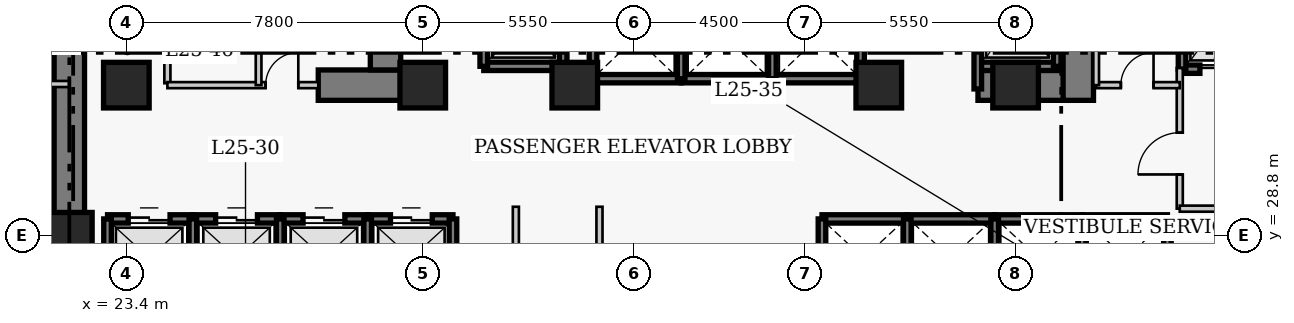
"""IFC4 building model, lengths in metres.
Left out: names, types, materials, properties, quantities, classifications, styles, units other than length and angle.
Written with IfcOpenShell. Run it as: python <this file> out.ifc"""

import sys

from ifc_helpers import new_model, si_unit, direction, frame, frame_2d, origin, origin_2d, place, context, subcontext, project, spatial, rectangle, extrude, element, fill, save


model = new_model("IFC4")
c1 = context("Model", 3, precision=1e-05, world=origin(), true_north=direction((0.0, 1.0)))
c2 = subcontext(c1, "Body", "Model", "MODEL_VIEW")
j1 = project(units=[si_unit("LENGTHUNIT", "METRE"), si_unit("PLANEANGLEUNIT", "RADIAN")], contexts=[c1])
p1 = place(None, origin())
s1 = spatial("IfcSite", under=j1, at=p1, CompositionType="ELEMENT")
p2 = place(p1, origin())
s2 = spatial("IfcBuilding", under=s1, at=p2, CompositionType="ELEMENT")
p3 = place(p2, frame((0.0, 0.0, 103.2)))
s3 = spatial("IfcBuildingStorey", under=s2, at=p3, CompositionType="ELEMENT", Elevation=103.2)
p4 = place(p3, frame((21.9, 27.05, 0.0), z_axis=(0.0, 0.0, 1.0), x_axis=(0.0, 1.0, 0.0)))
e1 = element("IfcWall", 1, at=p4, inside=s3, PredefinedType="SHEAR", context=c2, shape_type="SweptSolid", body=[
    extrude(rectangle(XDim=13.67, YDim=0.8, at=frame_2d((6.835, 0.0))), origin(), (0.0, 0.0, 1.0), 3.8),
])
p5 = place(p3, frame((28.45, 32.75, 0.0), z_axis=(0.0, 0.0, 1.0), x_axis=(1.0, 0.0, 0.0)))
e2 = element("IfcWall", 2, at=p5, inside=s3, PredefinedType="SHEAR", context=c2, shape_type="SweptSolid", body=[
    extrude(rectangle(XDim=2.4, YDim=0.8, at=frame_2d((1.2, 0.0))), origin(), (0.0, 0.0, 1.0), 3.8),
])
p6 = place(p3, frame((45.81, 32.75, 0.0), z_axis=(0.0, 0.0, 1.0), x_axis=(1.0, 0.0, 0.0)))
e3 = element("IfcWall", 3, at=p6, inside=s3, PredefinedType="SHEAR", context=c2, shape_type="SweptSolid", body=[
    extrude(rectangle(XDim=2.64, YDim=0.8, at=frame_2d((1.32, 0.0))), origin(), (0.0, 0.0, 1.0), 3.8),
])
p7 = place(p3, frame((30.22, 33.15, 0.0), z_axis=(0.0, 0.0, 1.0), x_axis=(0.0, 1.0, 0.0)))
e4 = element("IfcWall", 4, at=p7, inside=s3, PredefinedType="SHEAR", context=c2, shape_type="SweptSolid", body=[
    extrude(rectangle(XDim=7.17, YDim=0.8, at=frame_2d((3.585, 0.0))), origin(), (0.0, 0.0, 1.0), 3.8),
])
p8 = place(p3, frame((48.45, 32.35, 0.0), z_axis=(0.0, 0.0, 1.0), x_axis=(0.0, 1.0, 0.0)))
e5 = element("IfcWall", 5, at=p8, inside=s3, PredefinedType="SHEAR", context=c2, shape_type="SweptSolid", body=[
    extrude(rectangle(XDim=7.97, YDim=0.8, at=frame_2d((3.985, 0.0))), origin(), (0.0, 0.0, 1.0), 3.8),
])
p9 = place(p8, frame((5.85, 0.0, 0.0)))
e6 = element("IfcOpeningElement", 6, at=p9, cuts=e5, PredefinedType="OPENING", context=c2, shape_type="SweptSolid", body=[
    extrude(rectangle(XDim=1.1, YDim=2.15, at=frame_2d((0.55, 1.075))), frame((0.0, 0.41, 0.0), z_axis=(0.0, -1.0, 0.0), x_axis=(1.0, 0.0, 0.0)), (0.0, 0.0, 1.0), 0.82),
])
for number, where, z_axis, x_axis in (
    (7, (21.9, 28.8, 0.0), (0.0, 0.0, 1.0), (1.0, 0.0, 0.0)),
    (8, (23.4, 32.75, 0.0), (0.0, 0.0, 1.0), (1.0, 0.0, 0.0)),
    (9, (31.2, 32.75, 0.0), (0.0, 0.0, 1.0), (1.0, 0.0, 0.0)),
    (10, (35.2, 32.75, 0.0), (0.0, 0.0, 1.0), (1.0, 0.0, 0.0)),
    (11, (43.2, 32.75, 0.0), (0.0, 0.0, 1.0), (1.0, 0.0, 0.0)),
    (12, (46.8, 32.75, 0.0), (0.0, 0.0, 1.0), (1.0, 0.0, 0.0)),
):
    element("IfcColumn", number, at=place(p3, frame(where, z_axis=z_axis, x_axis=x_axis)), inside=s3, PredefinedType="COLUMN", context=c2, shape_type="SweptSolid", body=[
        extrude(rectangle(XDim=1.2, YDim=1.2, at=origin_2d()), origin(), (0.0, 0.0, 1.0), 3.8),
    ])
p10 = place(p3, frame((22.905, 29.23, 0.0), z_axis=(0.0, 0.0, 1.0), x_axis=(1.0, 0.0, 0.0)))
e13 = element("IfcWall", 13, at=p10, inside=s3, PredefinedType="SHEAR", context=c2, shape_type="SweptSolid", body=[
    extrude(rectangle(XDim=2.245, YDim=0.22, at=frame_2d((1.123, 0.0))), origin(), (0.0, 0.0, 1.0), 3.8),
])
p11 = place(p10, frame((0.545, 0.0, 0.0)))
e14 = element("IfcOpeningElement", 14, at=p11, cuts=e13, PredefinedType="OPENING", context=c2, shape_type="SweptSolid", body=[
    extrude(rectangle(XDim=1.1, YDim=2.15, at=frame_2d((0.55, 1.075))), frame((0.0, 0.12, 0.0), z_axis=(0.0, -1.0, 0.0), x_axis=(1.0, 0.0, 0.0)), (0.0, 0.0, 1.0), 0.24),
])
p12 = place(p3, frame((22.905, 27.17, 0.0), z_axis=(0.0, 0.0, 1.0), x_axis=(0.0, 1.0, 0.0)))
e15 = element("IfcWall", 15, at=p12, inside=s3, PredefinedType="SHEAR", context=c2, shape_type="SweptSolid", body=[
    extrude(rectangle(XDim=2.06, YDim=0.2, at=frame_2d((1.03, 0.0))), origin(), (0.0, 0.0, 1.0), 3.8),
])
p13 = place(p3, frame((25.15, 29.23, 0.0), z_axis=(0.0, 0.0, 1.0), x_axis=(1.0, 0.0, 0.0)))
e16 = element("IfcWall", 16, at=p13, inside=s3, PredefinedType="SHEAR", context=c2, shape_type="SweptSolid", body=[
    extrude(rectangle(XDim=2.3, YDim=0.22, at=frame_2d((1.15, 0.0))), origin(), (0.0, 0.0, 1.0), 3.8),
])
p14 = place(p13, frame((0.6, 0.0, 0.0)))
e17 = element("IfcOpeningElement", 17, at=p14, cuts=e16, PredefinedType="OPENING", context=c2, shape_type="SweptSolid", body=[
    extrude(rectangle(XDim=1.1, YDim=2.15, at=frame_2d((0.55, 1.075))), frame((0.0, 0.12, 0.0), z_axis=(0.0, -1.0, 0.0), x_axis=(1.0, 0.0, 0.0)), (0.0, 0.0, 1.0), 0.24),
])
p15 = place(p3, frame((25.15, 27.17, 0.0), z_axis=(0.0, 0.0, 1.0), x_axis=(0.0, 1.0, 0.0)))
e18 = element("IfcWall", 18, at=p15, inside=s3, PredefinedType="SHEAR", context=c2, shape_type="SweptSolid", body=[
    extrude(rectangle(XDim=2.06, YDim=0.2, at=frame_2d((1.03, 0.0))), origin(), (0.0, 0.0, 1.0), 3.8),
])
p16 = place(p3, frame((27.45, 29.23, 0.0), z_axis=(0.0, 0.0, 1.0), x_axis=(1.0, 0.0, 0.0)))
e19 = element("IfcWall", 19, at=p16, inside=s3, PredefinedType="SHEAR", context=c2, shape_type="SweptSolid", body=[
    extrude(rectangle(XDim=2.3, YDim=0.22, at=frame_2d((1.15, 0.0))), origin(), (0.0, 0.0, 1.0), 3.8),
])
p17 = place(p16, frame((0.6, 0.0, 0.0)))
e20 = element("IfcOpeningElement", 20, at=p17, cuts=e19, PredefinedType="OPENING", context=c2, shape_type="SweptSolid", body=[
    extrude(rectangle(XDim=1.1, YDim=2.15, at=frame_2d((0.55, 1.075))), frame((0.0, 0.12, 0.0), z_axis=(0.0, -1.0, 0.0), x_axis=(1.0, 0.0, 0.0)), (0.0, 0.0, 1.0), 0.24),
])
p18 = place(p3, frame((27.45, 27.17, 0.0), z_axis=(0.0, 0.0, 1.0), x_axis=(0.0, 1.0, 0.0)))
e21 = element("IfcWall", 21, at=p18, inside=s3, PredefinedType="SHEAR", context=c2, shape_type="SweptSolid", body=[
    extrude(rectangle(XDim=2.06, YDim=0.2, at=frame_2d((1.03, 0.0))), origin(), (0.0, 0.0, 1.0), 3.8),
])
p19 = place(p3, frame((29.75, 29.23, 0.0), z_axis=(0.0, 0.0, 1.0), x_axis=(1.0, 0.0, 0.0)))
e22 = element("IfcWall", 22, at=p19, inside=s3, PredefinedType="SHEAR", context=c2, shape_type="SweptSolid", body=[
    extrude(rectangle(XDim=2.245, YDim=0.22, at=frame_2d((1.123, 0.0))), origin(), (0.0, 0.0, 1.0), 3.8),
])
p20 = place(p19, frame((0.6, 0.0, 0.0)))
e23 = element("IfcOpeningElement", 23, at=p20, cuts=e22, PredefinedType="OPENING", context=c2, shape_type="SweptSolid", body=[
    extrude(rectangle(XDim=1.1, YDim=2.15, at=frame_2d((0.55, 1.075))), frame((0.0, 0.12, 0.0), z_axis=(0.0, -1.0, 0.0), x_axis=(1.0, 0.0, 0.0)), (0.0, 0.0, 1.0), 0.24),
])
for number, where, z_axis, x_axis in (
    (24, (29.75, 27.17, 0.0), (0.0, 0.0, 1.0), (0.0, 1.0, 0.0)),
    (25, (31.995, 27.17, 0.0), (0.0, 0.0, 1.0), (0.0, 1.0, 0.0)),
):
    element("IfcWall", number, at=place(p3, frame(where, z_axis=z_axis, x_axis=x_axis)), inside=s3, PredefinedType="SHEAR", context=c2, shape_type="SweptSolid", body=[
        extrude(rectangle(XDim=2.06, YDim=0.2, at=frame_2d((1.03, 0.0))), origin(), (0.0, 0.0, 1.0), 3.8),
    ])
p21 = place(p3, frame((41.705, 29.23, 0.0), z_axis=(0.0, 0.0, 1.0), x_axis=(1.0, 0.0, 0.0)))
e26 = element("IfcWall", 26, at=p21, inside=s3, PredefinedType="SHEAR", context=c2, shape_type="SweptSolid", body=[
    extrude(rectangle(XDim=2.245, YDim=0.22, at=frame_2d((1.123, 0.0))), origin(), (0.0, 0.0, 1.0), 3.8),
])
p22 = place(p3, frame((41.705, 27.17, 0.0), z_axis=(0.0, 0.0, 1.0), x_axis=(0.0, 1.0, 0.0)))
e27 = element("IfcWall", 27, at=p22, inside=s3, PredefinedType="SHEAR", context=c2, shape_type="SweptSolid", body=[
    extrude(rectangle(XDim=2.06, YDim=0.2, at=frame_2d((1.03, 0.0))), origin(), (0.0, 0.0, 1.0), 3.8),
])
p23 = place(p3, frame((43.95, 29.23, 0.0), z_axis=(0.0, 0.0, 1.0), x_axis=(1.0, 0.0, 0.0)))
e28 = element("IfcWall", 28, at=p23, inside=s3, PredefinedType="SHEAR", context=c2, shape_type="SweptSolid", body=[
    extrude(rectangle(XDim=2.3, YDim=0.22, at=frame_2d((1.15, 0.0))), origin(), (0.0, 0.0, 1.0), 3.8),
])
p24 = place(p3, frame((43.95, 27.17, 0.0), z_axis=(0.0, 0.0, 1.0), x_axis=(0.0, 1.0, 0.0)))
e29 = element("IfcWall", 29, at=p24, inside=s3, PredefinedType="SHEAR", context=c2, shape_type="SweptSolid", body=[
    extrude(rectangle(XDim=2.06, YDim=0.2, at=frame_2d((1.03, 0.0))), origin(), (0.0, 0.0, 1.0), 3.8),
])
p25 = place(p3, frame((46.25, 29.23, 0.0), z_axis=(0.0, 0.0, 1.0), x_axis=(1.0, 0.0, 0.0)))
e30 = element("IfcWall", 30, at=p25, inside=s3, PredefinedType="SHEAR", context=c2, shape_type="SweptSolid", body=[
    extrude(rectangle(XDim=2.3, YDim=0.22, at=frame_2d((1.15, 0.0))), origin(), (0.0, 0.0, 1.0), 3.8),
])
p26 = place(p3, frame((46.25, 27.17, 0.0), z_axis=(0.0, 0.0, 1.0), x_axis=(0.0, 1.0, 0.0)))
e31 = element("IfcWall", 31, at=p26, inside=s3, PredefinedType="SHEAR", context=c2, shape_type="SweptSolid", body=[
    extrude(rectangle(XDim=2.06, YDim=0.2, at=frame_2d((1.03, 0.0))), origin(), (0.0, 0.0, 1.0), 3.8),
])
p27 = place(p3, frame((48.55, 29.23, 0.0), z_axis=(0.0, 0.0, 1.0), x_axis=(1.0, 0.0, 0.0)))
e32 = element("IfcWall", 32, at=p27, inside=s3, PredefinedType="SHEAR", context=c2, shape_type="SweptSolid", body=[
    extrude(rectangle(XDim=2.245, YDim=0.22, at=frame_2d((1.123, 0.0))), origin(), (0.0, 0.0, 1.0), 3.8),
])
for number, where, z_axis, x_axis in (
    (33, (48.55, 27.17, 0.0), (0.0, 0.0, 1.0), (0.0, 1.0, 0.0)),
    (34, (50.795, 27.17, 0.0), (0.0, 0.0, 1.0), (0.0, 1.0, 0.0)),
):
    element("IfcWall", number, at=place(p3, frame(where, z_axis=z_axis, x_axis=x_axis)), inside=s3, PredefinedType="SHEAR", context=c2, shape_type="SweptSolid", body=[
        extrude(rectangle(XDim=2.06, YDim=0.2, at=frame_2d((1.03, 0.0))), origin(), (0.0, 0.0, 1.0), 3.8),
    ])
p28 = place(p3, frame((35.68, 32.92, 0.0), z_axis=(0.0, 0.0, 1.0), x_axis=(1.0, 0.0, 0.0)))
e35 = element("IfcWall", 35, at=p28, inside=s3, PredefinedType="SHEAR", context=c2, shape_type="SweptSolid", body=[
    extrude(rectangle(XDim=2.32, YDim=0.22, at=frame_2d((1.16, 0.0))), origin(), (0.0, 0.0, 1.0), 3.8),
])
p29 = place(p3, frame((35.68, 32.92, 0.0), z_axis=(0.0, 0.0, 1.0), x_axis=(0.0, 1.0, 0.0)))
e36 = element("IfcWall", 36, at=p29, inside=s3, PredefinedType="SHEAR", context=c2, shape_type="SweptSolid", body=[
    extrude(rectangle(XDim=2.16, YDim=0.2, at=frame_2d((1.08, 0.0))), origin(), (0.0, 0.0, 1.0), 3.8),
])
p30 = place(p3, frame((38.0, 32.92, 0.0), z_axis=(0.0, 0.0, 1.0), x_axis=(1.0, 0.0, 0.0)))
e37 = element("IfcWall", 37, at=p30, inside=s3, PredefinedType="SHEAR", context=c2, shape_type="SweptSolid", body=[
    extrude(rectangle(XDim=2.4, YDim=0.22, at=frame_2d((1.2, 0.0))), origin(), (0.0, 0.0, 1.0), 3.8),
])
p31 = place(p3, frame((38.0, 32.92, 0.0), z_axis=(0.0, 0.0, 1.0), x_axis=(0.0, 1.0, 0.0)))
e38 = element("IfcWall", 38, at=p31, inside=s3, PredefinedType="SHEAR", context=c2, shape_type="SweptSolid", body=[
    extrude(rectangle(XDim=2.16, YDim=0.2, at=frame_2d((1.08, 0.0))), origin(), (0.0, 0.0, 1.0), 3.8),
])
p32 = place(p3, frame((40.4, 32.92, 0.0), z_axis=(0.0, 0.0, 1.0), x_axis=(1.0, 0.0, 0.0)))
e39 = element("IfcWall", 39, at=p32, inside=s3, PredefinedType="SHEAR", context=c2, shape_type="SweptSolid", body=[
    extrude(rectangle(XDim=2.32, YDim=0.22, at=frame_2d((1.16, 0.0))), origin(), (0.0, 0.0, 1.0), 3.8),
])
for number, where, z_axis, x_axis in (
    (40, (40.4, 32.92, 0.0), (0.0, 0.0, 1.0), (0.0, 1.0, 0.0)),
    (41, (42.72, 32.92, 0.0), (0.0, 0.0, 1.0), (0.0, 1.0, 0.0)),
):
    element("IfcWall", number, at=place(p3, frame(where, z_axis=z_axis, x_axis=x_axis)), inside=s3, PredefinedType="SHEAR", context=c2, shape_type="SweptSolid", body=[
        extrude(rectangle(XDim=2.16, YDim=0.2, at=frame_2d((1.08, 0.0))), origin(), (0.0, 0.0, 1.0), 3.8),
    ])
p33 = place(p3, frame((51.18, 33.17, 0.0), z_axis=(0.0, 0.0, 1.0), x_axis=(1.0, 0.0, 0.0)))
e42 = element("IfcWall", 42, at=p33, inside=s3, PredefinedType="SHEAR", context=c2, shape_type="SweptSolid", body=[
    extrude(rectangle(XDim=2.42, YDim=0.22, at=frame_2d((1.21, 0.0))), origin(), (0.0, 0.0, 1.0), 3.8),
])
p34 = place(p33, frame((0.47, 0.0, 0.0)))
e43 = element("IfcOpeningElement", 43, at=p34, cuts=e42, PredefinedType="OPENING", context=c2, shape_type="SweptSolid", body=[
    extrude(rectangle(XDim=1.3, YDim=2.15, at=frame_2d((0.65, 1.075))), frame((0.0, 0.12, 0.0), z_axis=(0.0, -1.0, 0.0), x_axis=(1.0, 0.0, 0.0)), (0.0, 0.0, 1.0), 0.24),
])
p35 = place(p3, frame((51.18, 33.17, 0.0), z_axis=(0.0, 0.0, 1.0), x_axis=(0.0, 1.0, 0.0)))
e44 = element("IfcWall", 44, at=p35, inside=s3, PredefinedType="SHEAR", context=c2, shape_type="SweptSolid", body=[
    extrude(rectangle(XDim=2.86, YDim=0.2, at=frame_2d((1.43, 0.0))), origin(), (0.0, 0.0, 1.0), 3.8),
])
p36 = place(p3, frame((32.805, 33.245, 0.0), z_axis=(0.0, 0.0, 1.0), x_axis=(1.0, 0.0, 0.0)))
e45 = element("IfcWall", 45, at=p36, inside=s3, PredefinedType="SHEAR", context=c2, shape_type="SweptSolid", body=[
    extrude(rectangle(XDim=2.09, YDim=0.22, at=frame_2d((1.045, 0.0))), origin(), (0.0, 0.0, 1.0), 3.8),
])
for number, where, z_axis, x_axis in (
    (46, (32.805, 33.245, 0.0), (0.0, 0.0, 1.0), (0.0, 1.0, 0.0)),
    (47, (34.895, 33.245, 0.0), (0.0, 0.0, 1.0), (0.0, 1.0, 0.0)),
):
    element("IfcWall", number, at=place(p3, frame(where, z_axis=z_axis, x_axis=x_axis)), inside=s3, PredefinedType="SHEAR", context=c2, shape_type="SweptSolid", body=[
        extrude(rectangle(XDim=2.91, YDim=0.2, at=frame_2d((1.455, 0.0))), origin(), (0.0, 0.0, 1.0), 3.8),
    ])
p37 = place(p3, frame((45.805, 33.245, 0.0), z_axis=(0.0, 0.0, 1.0), x_axis=(1.0, 0.0, 0.0)))
e48 = element("IfcWall", 48, at=p37, inside=s3, PredefinedType="SHEAR", context=c2, shape_type="SweptSolid", body=[
    extrude(rectangle(XDim=2.09, YDim=0.22, at=frame_2d((1.045, 0.0))), origin(), (0.0, 0.0, 1.0), 3.8),
])
p38 = place(p3, frame((45.805, 32.65, 0.0), z_axis=(0.0, 0.0, 1.0), x_axis=(0.0, 1.0, 0.0)))
e49 = element("IfcWall", 49, at=p38, inside=s3, PredefinedType="SHEAR", context=c2, shape_type="SweptSolid", body=[
    extrude(rectangle(XDim=3.505, YDim=0.2, at=frame_2d((1.752, 0.0))), origin(), (0.0, 0.0, 1.0), 3.8),
])
p39 = place(p3, frame((47.895, 33.245, 0.0), z_axis=(0.0, 0.0, 1.0), x_axis=(0.0, 1.0, 0.0)))
e50 = element("IfcWall", 50, at=p39, inside=s3, PredefinedType="SHEAR", context=c2, shape_type="SweptSolid", body=[
    extrude(rectangle(XDim=2.91, YDim=0.2, at=frame_2d((1.455, 0.0))), origin(), (0.0, 0.0, 1.0), 3.8),
])
p40 = place(p3, frame((24.48, 32.8, 0.0), z_axis=(0.0, 0.0, 1.0), x_axis=(0.0, 1.0, 0.0)))
e51 = element("IfcWall", 51, at=p40, inside=s3, PredefinedType="PARTITIONING", context=c2, shape_type="SweptSolid", body=[
    extrude(rectangle(XDim=3.57, YDim=0.16, at=frame_2d((1.785, 0.0))), origin(), (0.0, 0.0, 1.0), 3.54),
])
p41 = place(p40, frame((1.604, 0.0, 0.0)))
e52 = element("IfcOpeningElement", 52, at=p41, cuts=e51, PredefinedType="OPENING", context=c2, shape_type="SweptSolid", body=[
    extrude(rectangle(XDim=0.9, YDim=2.1, at=frame_2d((0.45, 1.05))), frame((0.0, 0.09, 0.0), z_axis=(0.0, -1.0, 0.0), x_axis=(1.0, 0.0, 0.0)), (0.0, 0.0, 1.0), 0.18),
])
p42 = place(p3, frame((51.12, 29.5, 0.0), z_axis=(0.0, 0.0, 1.0), x_axis=(0.0, 1.0, 0.0)))
e53 = element("IfcWall", 53, at=p42, inside=s3, PredefinedType="PARTITIONING", context=c2, shape_type="SweptSolid", body=[
    extrude(rectangle(XDim=3.7, YDim=0.16, at=frame_2d((1.85, 0.0))), origin(), (0.0, 0.0, 1.0), 3.54),
])
p43 = place(p42, frame((0.9, 0.0, 0.0)))
e54 = element("IfcOpeningElement", 54, at=p43, cuts=e53, PredefinedType="OPENING", context=c2, shape_type="SweptSolid", body=[
    extrude(rectangle(XDim=1.1, YDim=2.15, at=frame_2d((0.55, 1.075))), frame((0.0, 0.09, 0.0), z_axis=(0.0, -1.0, 0.0), x_axis=(1.0, 0.0, 0.0)), (0.0, 0.0, 1.0), 0.18),
])
p44 = place(p3, frame((51.12, 29.5, 0.0), z_axis=(0.0, 0.0, 1.0), x_axis=(1.0, 0.0, 0.0)))
e55 = element("IfcWall", 55, at=p44, inside=s3, PredefinedType="PARTITIONING", context=c2, shape_type="SweptSolid", body=[
    extrude(rectangle(XDim=5.63, YDim=0.16, at=frame_2d((2.815, 0.0))), origin(), (0.0, 0.0, 1.0), 3.54),
])
p45 = place(p3, frame((24.48, 32.75, 0.0), z_axis=(0.0, 0.0, 1.0), x_axis=(1.0, 0.0, 0.0)))
e56 = element("IfcWall", 56, at=p45, inside=s3, PredefinedType="PARTITIONING", context=c2, shape_type="SweptSolid", body=[
    extrude(rectangle(XDim=3.97, YDim=0.16, at=frame_2d((1.985, 0.0))), origin(), (0.0, 0.0, 1.0), 3.54),
])
p46 = place(p45, frame((2.585, 0.0, 0.0)))
e57 = element("IfcOpeningElement", 57, at=p46, cuts=e56, PredefinedType="OPENING", context=c2, shape_type="SweptSolid", body=[
    extrude(rectangle(XDim=0.86, YDim=2.05, at=frame_2d((0.43, 1.025))), frame((0.0, 0.09, 0.0), z_axis=(0.0, -1.0, 0.0), x_axis=(1.0, 0.0, 0.0)), (0.0, 0.0, 1.0), 0.18),
])
p47 = place(p3, frame((48.92, 32.75, 0.0), z_axis=(0.0, 0.0, 1.0), x_axis=(1.0, 0.0, 0.0)))
e58 = element("IfcWall", 58, at=p47, inside=s3, PredefinedType="PARTITIONING", context=c2, shape_type="SweptSolid", body=[
    extrude(rectangle(XDim=2.2, YDim=0.16, at=frame_2d((1.1, 0.0))), origin(), (0.0, 0.0, 1.0), 3.54),
])
p48 = place(p47, frame((0.65, 0.0, 0.0)))
e59 = element("IfcOpeningElement", 59, at=p48, cuts=e58, PredefinedType="OPENING", context=c2, shape_type="SweptSolid", body=[
    extrude(rectangle(XDim=0.86, YDim=2.05, at=frame_2d((0.43, 1.025))), frame((0.0, 0.09, 0.0), z_axis=(0.0, -1.0, 0.0), x_axis=(1.0, 0.0, 0.0)), (0.0, 0.0, 1.0), 0.18),
])
for number, where, z_axis, x_axis in (
    (60, (48.92, 32.75, 0.0), (0.0, 0.0, 1.0), (0.0, 1.0, 0.0)),
    (61, (26.88, 32.75, 0.0), (0.0, 0.0, 1.0), (0.0, 1.0, 0.0)),
):
    element("IfcWall", number, at=place(p3, frame(where, z_axis=z_axis, x_axis=x_axis)), inside=s3, PredefinedType="PARTITIONING", context=c2, shape_type="SweptSolid", body=[
        extrude(rectangle(XDim=3.62, YDim=0.15, at=frame_2d((1.81, 0.0))), origin(), (0.0, 0.0, 1.0), 3.54),
    ])
for number, where, z_axis, x_axis in (
    (62, (33.65, 26.36, 0.0), (0.0, 0.0, 1.0), (0.0, 1.0, 0.0)),
    (63, (35.85, 26.36, 0.0), (0.0, 0.0, 1.0), (0.0, 1.0, 0.0)),
):
    element("IfcWall", number, at=place(p3, frame(where, z_axis=z_axis, x_axis=x_axis)), inside=s3, PredefinedType="PARTITIONING", context=c2, shape_type="SweptSolid", body=[
        extrude(rectangle(XDim=3.19, YDim=0.16, at=frame_2d((1.595, 0.0))), origin(), (0.0, 0.0, 1.0), 3.54),
    ])
p49 = place(p3, frame((19.96, 32.78, 0.0), z_axis=(0.0, 0.0, 1.0), x_axis=(1.0, 0.0, 0.0)))
e64 = element("IfcWall", 64, at=p49, inside=s3, PredefinedType="PARTITIONING", context=c2, shape_type="SweptSolid", body=[
    extrude(rectangle(XDim=1.94, YDim=0.16, at=frame_2d((0.97, 0.0))), origin(), (0.0, 0.0, 1.0), 3.54),
])
p50 = place(p11, origin())
e65 = element("IfcDoor", 65, at=p50, inside=s3, OperationType="DOUBLE_DOOR_SLIDING", PredefinedType="DOOR", context=c2, shape_type="SweptSolid", body=[
    extrude(rectangle(XDim=1.1, YDim=2.15, at=frame_2d((0.55, 1.075))), frame((0.0, 0.025, 0.0), z_axis=(0.0, -1.0, 0.0), x_axis=(1.0, 0.0, 0.0)), (0.0, 0.0, 1.0), 0.05),
])
fill(e14, e65)
p51 = place(p14, origin())
e66 = element("IfcDoor", 66, at=p51, inside=s3, OperationType="DOUBLE_DOOR_SLIDING", PredefinedType="DOOR", context=c2, shape_type="SweptSolid", body=[
    extrude(rectangle(XDim=1.1, YDim=2.15, at=frame_2d((0.55, 1.075))), frame((0.0, 0.025, 0.0), z_axis=(0.0, -1.0, 0.0), x_axis=(1.0, 0.0, 0.0)), (0.0, 0.0, 1.0), 0.05),
])
fill(e17, e66)
p52 = place(p17, origin())
e67 = element("IfcDoor", 67, at=p52, inside=s3, OperationType="DOUBLE_DOOR_SLIDING", PredefinedType="DOOR", context=c2, shape_type="SweptSolid", body=[
    extrude(rectangle(XDim=1.1, YDim=2.15, at=frame_2d((0.55, 1.075))), frame((0.0, 0.025, 0.0), z_axis=(0.0, -1.0, 0.0), x_axis=(1.0, 0.0, 0.0)), (0.0, 0.0, 1.0), 0.05),
])
fill(e20, e67)
p53 = place(p20, origin())
e68 = element("IfcDoor", 68, at=p53, inside=s3, OperationType="DOUBLE_DOOR_SLIDING", PredefinedType="DOOR", context=c2, shape_type="SweptSolid", body=[
    extrude(rectangle(XDim=1.1, YDim=2.15, at=frame_2d((0.55, 1.075))), frame((0.0, 0.025, 0.0), z_axis=(0.0, -1.0, 0.0), x_axis=(1.0, 0.0, 0.0)), (0.0, 0.0, 1.0), 0.05),
])
fill(e23, e68)
p54 = place(p34, origin())
e69 = element("IfcDoor", 69, at=p54, inside=s3, OperationType="DOUBLE_DOOR_SLIDING", PredefinedType="DOOR", context=c2, shape_type="SweptSolid", body=[
    extrude(rectangle(XDim=1.3, YDim=2.15, at=frame_2d((0.65, 1.075))), frame((0.0, 0.025, 0.0), z_axis=(0.0, -1.0, 0.0), x_axis=(1.0, 0.0, 0.0)), (0.0, 0.0, 1.0), 0.05),
])
fill(e43, e69)
p55 = place(p43, origin())
e70 = element("IfcDoor", 70, at=p55, inside=s3, OperationType="SINGLE_SWING_LEFT", PredefinedType="DOOR", context=c2, shape_type="SweptSolid", body=[
    extrude(rectangle(XDim=1.1, YDim=2.15, at=frame_2d((0.55, 1.075))), frame((0.0, 0.025, 0.0), z_axis=(0.0, -1.0, 0.0), x_axis=(1.0, 0.0, 0.0)), (0.0, 0.0, 1.0), 0.05),
])
fill(e54, e70)
p56 = place(p46, origin())
e71 = element("IfcDoor", 71, at=p56, inside=s3, OperationType="SINGLE_SWING_RIGHT", PredefinedType="DOOR", context=c2, shape_type="SweptSolid", body=[
    extrude(rectangle(XDim=0.86, YDim=2.05, at=frame_2d((0.43, 1.025))), frame((0.0, 0.025, 0.0), z_axis=(0.0, -1.0, 0.0), x_axis=(1.0, 0.0, 0.0)), (0.0, 0.0, 1.0), 0.05),
])
fill(e57, e71)
p57 = place(p48, origin())
e72 = element("IfcDoor", 72, at=p57, inside=s3, OperationType="SINGLE_SWING_RIGHT", PredefinedType="DOOR", context=c2, shape_type="SweptSolid", body=[
    extrude(rectangle(XDim=0.86, YDim=2.05, at=frame_2d((0.43, 1.025))), frame((0.0, 0.025, 0.0), z_axis=(0.0, -1.0, 0.0), x_axis=(1.0, 0.0, 0.0)), (0.0, 0.0, 1.0), 0.05),
])
fill(e59, e72)
save(model, sys.argv[1])
